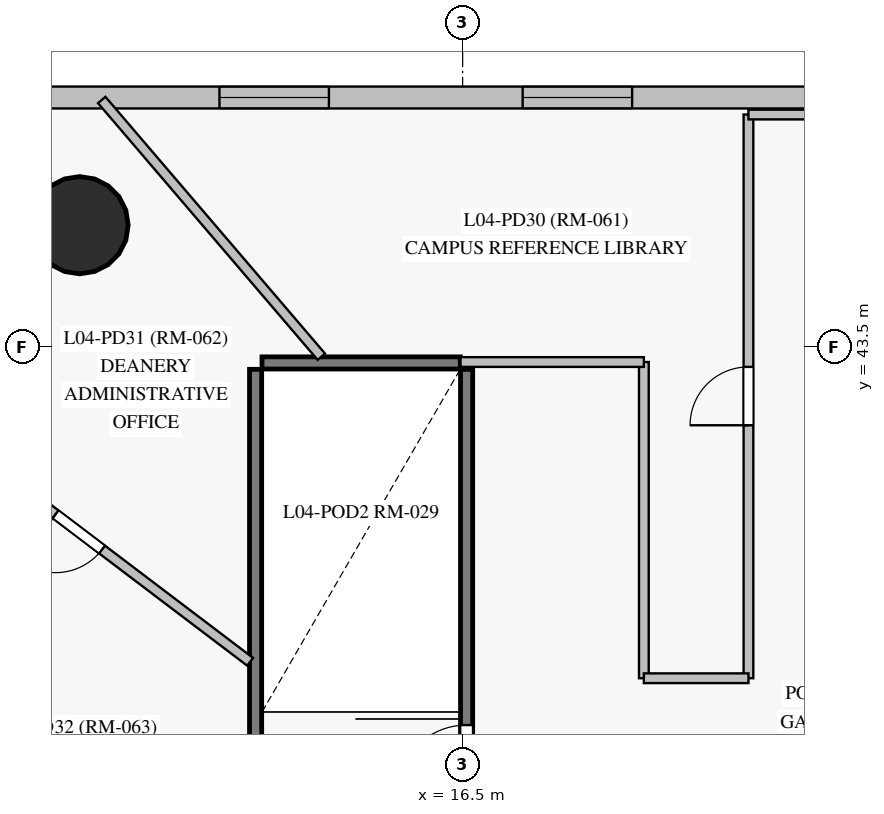
"""IFC4 building model, lengths in metres.
Left out: names, types, materials, properties, quantities, classifications, styles, units other than length and angle.
Written with IfcOpenShell. Run it as: python <this file> out.ifc"""

import sys

from ifc_helpers import new_model, si_unit, direction, frame, frame_2d, origin, origin_with_axes, origin_2d, place, context, subcontext, project, spatial, rectangle, circle, extrude, source, transform, mapped, element, fill, save


model = new_model("IFC4")
c1 = context("Model", 3, precision=1e-05, world=origin(), true_north=direction((0.0, 1.0)))
c2 = subcontext(c1, "Body", "Model", "MODEL_VIEW")
j1 = project(units=[si_unit("LENGTHUNIT", "METRE"), si_unit("PLANEANGLEUNIT", "RADIAN")], contexts=[c1])
p1 = place(None, origin())
s1 = spatial("IfcSite", under=j1, at=p1, CompositionType="ELEMENT")
p2 = place(p1, origin())
s2 = spatial("IfcBuilding", under=s1, at=p2, CompositionType="ELEMENT")
p3 = place(p2, frame((0.0, 0.0, 18.0)))
s3 = spatial("IfcBuildingStorey", under=s2, at=p3, CompositionType="ELEMENT", Elevation=18.0)
m1 = source(origin_with_axes(), c2, "Body", "SweptSolid", [
    extrude(circle(Radius=0.8, at=origin_2d()), origin(), (0.0, 0.0, 1.0), 4.5),
])
p4 = place(p3, frame((10.2, 45.5, 0.0), z_axis=(0.0, 0.0, 1.0), x_axis=(1.0, 0.0, 0.0)))
e1 = element("IfcColumn", 1, at=p4, inside=s3, PredefinedType="COLUMN", context=c2, shape_type="MappedRepresentation", body=[
    mapped(m1, transform((0.0, 0.0, 0.0), scale=1.0)),
])
p5 = place(p3, frame((53.4, 47.6, 0.0), z_axis=(0.0, 0.0, 1.0), x_axis=(-1.0, 0.0, 0.0)))
e2 = element("IfcWall", 2, at=p5, inside=s3, PredefinedType="SOLIDWALL", context=c2, shape_type="SweptSolid", body=[
    extrude(rectangle(XDim=44.3, YDim=0.36, at=frame_2d((22.15, 0.0))), origin(), (0.0, 0.0, 1.0), 4.225),
])
p6 = place(p5, frame((1.763, 0.0, 0.85)))
e3 = element("IfcOpeningElement", 3, at=p6, cuts=e2, PredefinedType="OPENING", context=c2, shape_type="SweptSolid", body=[
    extrude(rectangle(XDim=1.8, YDim=2.2, at=frame_2d((0.9, 1.1))), frame((0.0, 0.19, 0.0), z_axis=(0.0, -1.0, 0.0), x_axis=(1.0, 0.0, 0.0)), (0.0, 0.0, 1.0), 0.38),
])
p7 = place(p5, frame((6.906, 0.0, 0.85)))
e4 = element("IfcOpeningElement", 4, at=p7, cuts=e2, PredefinedType="OPENING", context=c2, shape_type="SweptSolid", body=[
    extrude(rectangle(XDim=1.8, YDim=2.2, at=frame_2d((0.9, 1.1))), frame((0.0, 0.19, 0.0), z_axis=(0.0, -1.0, 0.0), x_axis=(1.0, 0.0, 0.0)), (0.0, 0.0, 1.0), 0.38),
])
p8 = place(p5, frame((11.903, 0.0, 0.85)))
e5 = element("IfcOpeningElement", 5, at=p8, cuts=e2, PredefinedType="OPENING", context=c2, shape_type="SweptSolid", body=[
    extrude(rectangle(XDim=1.8, YDim=2.2, at=frame_2d((0.9, 1.1))), frame((0.0, 0.19, 0.0), z_axis=(0.0, -1.0, 0.0), x_axis=(1.0, 0.0, 0.0)), (0.0, 0.0, 1.0), 0.38),
])
p9 = place(p5, frame((16.2, 0.0, 0.85)))
e6 = element("IfcOpeningElement", 6, at=p9, cuts=e2, PredefinedType="OPENING", context=c2, shape_type="SweptSolid", body=[
    extrude(rectangle(XDim=1.8, YDim=2.2, at=frame_2d((0.9, 1.1))), frame((0.0, 0.19, 0.0), z_axis=(0.0, -1.0, 0.0), x_axis=(1.0, 0.0, 0.0)), (0.0, 0.0, 1.0), 0.38),
])
p10 = place(p5, frame((23.82, 0.0, 0.85)))
e7 = element("IfcOpeningElement", 7, at=p10, cuts=e2, PredefinedType="OPENING", context=c2, shape_type="SweptSolid", body=[
    extrude(rectangle(XDim=1.8, YDim=2.2, at=frame_2d((0.9, 1.1))), frame((0.0, 0.19, 0.0), z_axis=(0.0, -1.0, 0.0), x_axis=(1.0, 0.0, 0.0)), (0.0, 0.0, 1.0), 0.38),
])
p11 = place(p5, frame((29.2, 0.0, 0.85)))
e8 = element("IfcOpeningElement", 8, at=p11, cuts=e2, PredefinedType="OPENING", context=c2, shape_type="SweptSolid", body=[
    extrude(rectangle(XDim=1.8, YDim=2.2, at=frame_2d((0.9, 1.1))), frame((0.0, 0.19, 0.0), z_axis=(0.0, -1.0, 0.0), x_axis=(1.0, 0.0, 0.0)), (0.0, 0.0, 1.0), 0.38),
])
p12 = place(p5, frame((34.113, 0.0, 0.85)))
e9 = element("IfcOpeningElement", 9, at=p12, cuts=e2, PredefinedType="OPENING", context=c2, shape_type="SweptSolid", body=[
    extrude(rectangle(XDim=1.8, YDim=2.2, at=frame_2d((0.9, 1.1))), frame((0.0, 0.19, 0.0), z_axis=(0.0, -1.0, 0.0), x_axis=(1.0, 0.0, 0.0)), (0.0, 0.0, 1.0), 0.38),
])
p13 = place(p5, frame((39.1, 0.0, 0.85)))
e10 = element("IfcOpeningElement", 10, at=p13, cuts=e2, PredefinedType="OPENING", context=c2, shape_type="SweptSolid", body=[
    extrude(rectangle(XDim=1.8, YDim=2.2, at=frame_2d((0.9, 1.1))), frame((0.0, 0.19, 0.0), z_axis=(0.0, -1.0, 0.0), x_axis=(1.0, 0.0, 0.0)), (0.0, 0.0, 1.0), 0.38),
])
p14 = place(p3, frame((13.095, 35.78, 0.0), z_axis=(0.0, 0.0, 1.0), x_axis=(0.0, 1.0, 0.0)))
e11 = element("IfcWall", 11, at=p14, inside=s3, PredefinedType="SHEAR", context=c2, shape_type="SweptSolid", body=[
    extrude(rectangle(XDim=7.35, YDim=0.2, at=frame_2d((3.675, 0.0))), origin(), (0.0, 0.0, 1.0), 4.225),
])
p15 = place(p3, frame((16.565, 35.78, 0.0), z_axis=(0.0, 0.0, 1.0), x_axis=(0.0, 1.0, 0.0)))
e12 = element("IfcWall", 12, at=p15, inside=s3, PredefinedType="SHEAR", context=c2, shape_type="SweptSolid", body=[
    extrude(rectangle(XDim=7.35, YDim=0.2, at=frame_2d((3.675, 0.0))), origin(), (0.0, 0.0, 1.0), 4.225),
])
p16 = place(p15, frame((0.35, 0.0, 0.0)))
e13 = element("IfcOpeningElement", 13, at=p16, cuts=e12, PredefinedType="OPENING", context=c2, shape_type="SweptSolid", body=[
    extrude(rectangle(XDim=1.15, YDim=2.15, at=frame_2d((0.575, 1.075))), frame((0.0, 0.11, 0.0), z_axis=(0.0, -1.0, 0.0), x_axis=(1.0, 0.0, 0.0)), (0.0, 0.0, 1.0), 0.22),
])
p17 = place(p3, frame((13.2, 43.235, 0.0), z_axis=(0.0, 0.0, 1.0), x_axis=(1.0, 0.0, 0.0)))
e14 = element("IfcWall", 14, at=p17, inside=s3, PredefinedType="SHEAR", context=c2, shape_type="SweptSolid", body=[
    extrude(rectangle(XDim=3.26, YDim=0.2, at=frame_2d((1.63, 0.0))), origin(), (0.0, 0.0, 1.0), 4.225),
])
p18 = place(p3, frame((21.2, 38.05, 0.0), z_axis=(0.0, 0.0, 1.0), x_axis=(0.0, 1.0, 0.0)))
e15 = element("IfcWall", 15, at=p18, inside=s3, PredefinedType="PARTITIONING", context=c2, shape_type="SweptSolid", body=[
    extrude(rectangle(XDim=9.27, YDim=0.16, at=frame_2d((4.635, 0.0))), origin(), (0.0, 0.0, 1.0), 4.225),
])
p19 = place(p18, frame((4.16, 0.0, 0.0)))
e16 = element("IfcOpeningElement", 16, at=p19, cuts=e15, PredefinedType="OPENING", context=c2, shape_type="SweptSolid", body=[
    extrude(rectangle(XDim=0.96, YDim=2.15, at=frame_2d((0.48, 1.075))), frame((0.0, 0.09, 0.0), z_axis=(0.0, -1.0, 0.0), x_axis=(1.0, 0.0, 0.0)), (0.0, 0.0, 1.0), 0.18),
])
p20 = place(p3, frame((13.005, 38.321, 0.0), z_axis=(0.0, 0.0, 1.0), x_axis=(-0.796928360901, 0.604073826276, 0.0)))
e17 = element("IfcWall", 17, at=p20, inside=s3, PredefinedType="PARTITIONING", context=c2, shape_type="SweptSolid", body=[
    extrude(rectangle(XDim=7.111, YDim=0.16, at=frame_2d((3.555, 0.0))), origin(), (0.0, 0.0, 1.0), 4.225),
])
p21 = place(p20, frame((3.055, 0.0, 0.0)))
e18 = element("IfcOpeningElement", 18, at=p21, cuts=e17, PredefinedType="OPENING", context=c2, shape_type="SweptSolid", body=[
    extrude(rectangle(XDim=0.96, YDim=2.15, at=frame_2d((0.48, 1.075))), frame((0.0, 0.09, 0.0), z_axis=(0.0, -1.0, 0.0), x_axis=(1.0, 0.0, 0.0)), (0.0, 0.0, 1.0), 0.18),
])
p22 = place(p3, frame((14.177, 43.337, 0.0), z_axis=(0.0, 0.0, 1.0), x_axis=(-0.65004930136, 0.759892035622, 0.0)))
e19 = element("IfcWall", 19, at=p22, inside=s3, PredefinedType="PARTITIONING", context=c2, shape_type="SweptSolid", body=[
    extrude(rectangle(XDim=5.557, YDim=0.16, at=frame_2d((2.778, 0.0))), origin(), (0.0, 0.0, 1.0), 4.225),
])
p23 = place(p3, frame((19.48, 43.25, 0.0), z_axis=(0.0, 0.0, 1.0), x_axis=(0.0, -1.0, 0.0)))
e20 = element("IfcWall", 20, at=p23, inside=s3, PredefinedType="PARTITIONING", context=c2, shape_type="SweptSolid", body=[
    extrude(rectangle(XDim=5.2, YDim=0.16, at=frame_2d((2.6, 0.0))), origin(), (0.0, 0.0, 1.0), 4.225),
])
p24 = place(p3, frame((21.2, 47.32, 0.0), z_axis=(0.0, 0.0, 1.0), x_axis=(1.0, 0.0, 0.0)))
e21 = element("IfcWall", 21, at=p24, inside=s3, PredefinedType="PARTITIONING", context=c2, shape_type="SweptSolid", body=[
    extrude(rectangle(XDim=4.2, YDim=0.16, at=frame_2d((2.1, 0.0))), origin(), (0.0, 0.0, 1.0), 4.225),
])
p25 = place(p3, frame((16.465, 43.25, 0.0), z_axis=(0.0, 0.0, 1.0), x_axis=(1.0, 0.0, 0.0)))
e22 = element("IfcWall", 22, at=p25, inside=s3, PredefinedType="PARTITIONING", context=c2, shape_type="SweptSolid", body=[
    extrude(rectangle(XDim=3.015, YDim=0.16, at=frame_2d((1.507, 0.0))), origin(), (0.0, 0.0, 1.0), 4.225),
])
p26 = place(p3, frame((19.48, 38.05, 0.0), z_axis=(0.0, 0.0, 1.0), x_axis=(1.0, 0.0, 0.0)))
e23 = element("IfcWall", 23, at=p26, inside=s3, PredefinedType="PARTITIONING", context=c2, shape_type="SweptSolid", body=[
    extrude(rectangle(XDim=1.72, YDim=0.16, at=frame_2d((0.86, 0.0))), origin(), (0.0, 0.0, 1.0), 4.225),
])
m2 = source(origin_with_axes(), c2, "Body", "SweptSolid", [
    extrude(rectangle(XDim=1.8, YDim=2.2, at=frame_2d((0.9, 1.1))), frame((0.0, 0.03, 0.0), z_axis=(0.0, -1.0, 0.0), x_axis=(1.0, 0.0, 0.0)), (0.0, 0.0, 1.0), 0.06),
])
p27 = place(p12, origin())
e24 = element("IfcWindow", 24, at=p27, inside=s3, PartitioningType="SINGLE_PANEL", PredefinedType="WINDOW", context=c2, shape_type="MappedRepresentation", body=[
    mapped(m2, transform((0.0, 0.0, 0.0), scale=1.0)),
])
fill(e9, e24)
p28 = place(p13, origin())
e25 = element("IfcWindow", 25, at=p28, inside=s3, PartitioningType="SINGLE_PANEL", PredefinedType="WINDOW", context=c2, shape_type="MappedRepresentation", body=[
    mapped(m2, transform((0.0, 0.0, 0.0), scale=1.0)),
])
fill(e10, e25)
m3 = source(origin_with_axes(), c2, "Body", "SweptSolid", [
    extrude(rectangle(XDim=1.15, YDim=2.15, at=frame_2d((0.575, 1.075))), frame((0.0, 0.025, 0.0), z_axis=(0.0, -1.0, 0.0), x_axis=(1.0, 0.0, 0.0)), (0.0, 0.0, 1.0), 0.05),
])
p29 = place(p16, origin())
e26 = element("IfcDoor", 26, at=p29, inside=s3, OperationType="SINGLE_SWING_LEFT", PredefinedType="DOOR", context=c2, shape_type="MappedRepresentation", body=[
    mapped(m3, transform((0.0, 0.0, 0.0), scale=1.0)),
])
fill(e13, e26)
m4 = source(origin_with_axes(), c2, "Body", "SweptSolid", [
    extrude(rectangle(XDim=0.96, YDim=2.15, at=frame_2d((0.48, 1.075))), frame((0.0, 0.025, 0.0), z_axis=(0.0, -1.0, 0.0), x_axis=(1.0, 0.0, 0.0)), (0.0, 0.0, 1.0), 0.05),
])
p30 = place(p19, origin())
e27 = element("IfcDoor", 27, at=p30, inside=s3, OperationType="SINGLE_SWING_LEFT", PredefinedType="DOOR", context=c2, shape_type="MappedRepresentation", body=[
    mapped(m4, transform((0.0, 0.0, 0.0), scale=1.0)),
])
fill(e16, e27)
p31 = place(p21, origin())
e28 = element("IfcDoor", 28, at=p31, inside=s3, OperationType="SINGLE_SWING_RIGHT", PredefinedType="DOOR", context=c2, shape_type="MappedRepresentation", body=[
    mapped(m4, transform((0.0, 0.0, 0.0), scale=1.0)),
])
fill(e18, e28)
save(model, sys.argv[1])
